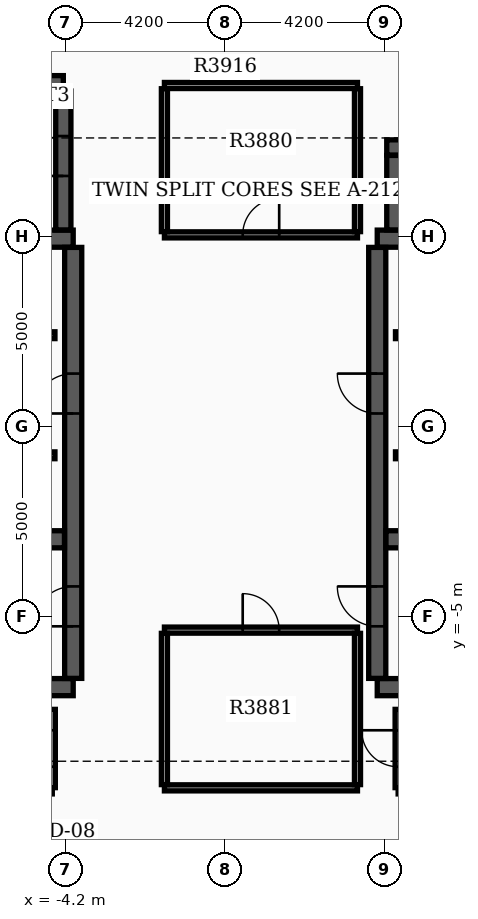
"""IFC4 building model, lengths in metres.
Left out: names, types, materials, properties, quantities, classifications, styles, units other than length and angle.
Written with IfcOpenShell. Run it as: python <this file> out.ifc"""

import sys

from ifc_helpers import new_model, si_unit, direction, frame, frame_2d, origin, place, context, subcontext, project, spatial, rectangle, extrude, element, fill, save


model = new_model("IFC4")
c1 = context("Model", 3, precision=1e-05, world=origin(), true_north=direction((0.0, 1.0)))
c2 = subcontext(c1, "Body", "Model", "MODEL_VIEW")
j1 = project(units=[si_unit("LENGTHUNIT", "METRE"), si_unit("PLANEANGLEUNIT", "RADIAN")], contexts=[c1])
p1 = place(None, origin())
s1 = spatial("IfcSite", under=j1, at=p1, CompositionType="ELEMENT")
p2 = place(p1, origin())
s2 = spatial("IfcBuilding", under=s1, at=p2, CompositionType="ELEMENT")
p3 = place(p2, frame((0.0, 0.0, 245.4)))
s3 = spatial("IfcBuildingStorey", under=s2, at=p3, CompositionType="ELEMENT", Elevation=245.4)
for number, where, z_axis, x_axis in (
    (1, (-12.4, -6.85, 0.0), (0.0, 0.0, 1.0), (1.0, 0.0, 0.0)),
    (2, (-12.4, 4.95, 0.0), (0.0, 0.0, 1.0), (1.0, 0.0, 0.0)),
):
    element("IfcWall", number, at=place(p3, frame(where, z_axis=z_axis, x_axis=x_axis)), inside=s3, PredefinedType="SHEAR", context=c2, shape_type="SweptSolid", body=[
        extrude(rectangle(XDim=8.4, YDim=0.45, at=frame_2d((4.2, 0.0))), origin(), (0.0, 0.0, 1.0), 4.3),
    ])
p4 = place(p3, frame((-4.0, -6.62, 0.0), z_axis=(0.0, 0.0, 1.0), x_axis=(0.0, 1.0, 0.0)))
e3 = element("IfcWall", 3, at=p4, inside=s3, PredefinedType="SHEAR", context=c2, shape_type="SweptSolid", body=[
    extrude(rectangle(XDim=11.34, YDim=0.45, at=frame_2d((5.67, 0.0))), origin(), (0.0, 0.0, 1.0), 4.3),
])
p5 = place(p4, frame((1.37, 0.0, 0.0)))
e4 = element("IfcOpeningElement", 4, at=p5, cuts=e3, PredefinedType="OPENING", context=c2, shape_type="SweptSolid", body=[
    extrude(rectangle(XDim=1.05, YDim=2.15, at=frame_2d((0.525, 1.075))), frame((0.0, 0.235, 0.0), z_axis=(0.0, -1.0, 0.0), x_axis=(1.0, 0.0, 0.0)), (0.0, 0.0, 1.0), 0.47),
])
p6 = place(p4, frame((6.97, 0.0, 0.0)))
e5 = element("IfcOpeningElement", 5, at=p6, cuts=e3, PredefinedType="OPENING", context=c2, shape_type="SweptSolid", body=[
    extrude(rectangle(XDim=1.05, YDim=2.15, at=frame_2d((0.525, 1.075))), frame((0.0, 0.235, 0.0), z_axis=(0.0, -1.0, 0.0), x_axis=(1.0, 0.0, 0.0)), (0.0, 0.0, 1.0), 0.47),
])
p7 = place(p3, frame((-12.17, -2.96, 0.0), z_axis=(0.0, 0.0, 1.0), x_axis=(1.0, 0.0, 0.0)))
e6 = element("IfcWall", 6, at=p7, inside=s3, PredefinedType="SHEAR", context=c2, shape_type="SweptSolid", body=[
    extrude(rectangle(XDim=7.94, YDim=0.45, at=frame_2d((3.97, 0.0))), origin(), (0.0, 0.0, 1.0), 4.3),
])
for number, where, z_axis, x_axis in (
    (7, (4.0, -6.85, 0.0), (0.0, 0.0, 1.0), (1.0, 0.0, 0.0)),
    (8, (4.0, 4.95, 0.0), (0.0, 0.0, 1.0), (1.0, 0.0, 0.0)),
):
    element("IfcWall", number, at=place(p3, frame(where, z_axis=z_axis, x_axis=x_axis)), inside=s3, PredefinedType="SHEAR", context=c2, shape_type="SweptSolid", body=[
        extrude(rectangle(XDim=8.4, YDim=0.45, at=frame_2d((4.2, 0.0))), origin(), (0.0, 0.0, 1.0), 4.3),
    ])
p8 = place(p3, frame((4.0, -6.62, 0.0), z_axis=(0.0, 0.0, 1.0), x_axis=(0.0, 1.0, 0.0)))
e9 = element("IfcWall", 9, at=p8, inside=s3, PredefinedType="SHEAR", context=c2, shape_type="SweptSolid", body=[
    extrude(rectangle(XDim=11.34, YDim=0.45, at=frame_2d((5.67, 0.0))), origin(), (0.0, 0.0, 1.0), 4.3),
])
p9 = place(p8, frame((1.37, 0.0, 0.0)))
e10 = element("IfcOpeningElement", 10, at=p9, cuts=e9, PredefinedType="OPENING", context=c2, shape_type="SweptSolid", body=[
    extrude(rectangle(XDim=1.05, YDim=2.15, at=frame_2d((0.525, 1.075))), frame((0.0, 0.235, 0.0), z_axis=(0.0, -1.0, 0.0), x_axis=(1.0, 0.0, 0.0)), (0.0, 0.0, 1.0), 0.47),
])
p10 = place(p8, frame((6.97, 0.0, 0.0)))
e11 = element("IfcOpeningElement", 11, at=p10, cuts=e9, PredefinedType="OPENING", context=c2, shape_type="SweptSolid", body=[
    extrude(rectangle(XDim=1.05, YDim=2.15, at=frame_2d((0.525, 1.075))), frame((0.0, 0.235, 0.0), z_axis=(0.0, -1.0, 0.0), x_axis=(1.0, 0.0, 0.0)), (0.0, 0.0, 1.0), 0.47),
])
p11 = place(p3, frame((4.23, -2.96, 0.0), z_axis=(0.0, 0.0, 1.0), x_axis=(1.0, 0.0, 0.0)))
e12 = element("IfcWall", 12, at=p11, inside=s3, PredefinedType="SHEAR", context=c2, shape_type="SweptSolid", body=[
    extrude(rectangle(XDim=7.94, YDim=0.45, at=frame_2d((3.97, 0.0))), origin(), (0.0, 0.0, 1.0), 4.3),
])
p12 = place(p3, frame((-12.22, 9.04, 0.0), z_axis=(0.0, 0.0, 1.0), x_axis=(1.0, 0.0, 0.0)))
e13 = element("IfcWall", 13, at=p12, inside=s3, PredefinedType="SHEAR", context=c2, shape_type="SweptSolid", body=[
    extrude(rectangle(XDim=7.96, YDim=0.4, at=frame_2d((3.98, 0.0))), origin(), (0.0, 0.0, 1.0), 4.3),
])
p13 = place(p3, frame((-4.26, 5.18, 0.0), z_axis=(0.0, 0.0, 1.0), x_axis=(0.0, 1.0, 0.0)))
e14 = element("IfcWall", 14, at=p13, inside=s3, PredefinedType="SHEAR", context=c2, shape_type="SweptSolid", body=[
    extrude(rectangle(XDim=3.655, YDim=0.4, at=frame_2d((1.828, 0.0))), origin(), (0.0, 0.0, 1.0), 4.3),
])
p14 = place(p13, frame((1.42, 0.0, 0.0)))
e15 = element("IfcOpeningElement", 15, at=p14, cuts=e14, PredefinedType="OPENING", context=c2, shape_type="SweptSolid", body=[
    extrude(rectangle(XDim=1.05, YDim=2.15, at=frame_2d((0.525, 1.075))), frame((0.0, 0.21, 0.0), z_axis=(0.0, -1.0, 0.0), x_axis=(1.0, 0.0, 0.0)), (0.0, 0.0, 1.0), 0.42),
])
p15 = place(p3, frame((4.45, 5.18, 0.0), z_axis=(0.0, 0.0, 1.0), x_axis=(0.0, 1.0, 0.0)))
e16 = element("IfcWall", 16, at=p15, inside=s3, PredefinedType="SHEAR", context=c2, shape_type="SweptSolid", body=[
    extrude(rectangle(XDim=1.96, YDim=0.4, at=frame_2d((0.98, 0.0))), origin(), (0.0, 0.0, 1.0), 4.3),
])
p16 = place(p3, frame((4.25, 7.35, 0.0), z_axis=(0.0, 0.0, 1.0), x_axis=(1.0, 0.0, 0.0)))
e17 = element("IfcWall", 17, at=p16, inside=s3, PredefinedType="SHEAR", context=c2, shape_type="SweptSolid", body=[
    extrude(rectangle(XDim=5.4, YDim=0.4, at=frame_2d((2.7, 0.0))), origin(), (0.0, 0.0, 1.0), 4.3),
])
p17 = place(p3, frame((-11.9, 2.41, 0.0), z_axis=(0.0, 0.0, 1.0), x_axis=(1.0, 0.0, 0.0)))
e18 = element("IfcWall", 18, at=p17, inside=s3, PredefinedType="SOLIDWALL", context=c2, shape_type="SweptSolid", body=[
    extrude(rectangle(XDim=7.42, YDim=0.18, at=frame_2d((3.71, 0.0))), origin(), (0.0, 0.0, 1.0), 3.37),
])
p18 = place(p17, frame((0.55, 0.0, 0.0)))
e19 = element("IfcOpeningElement", 19, at=p18, cuts=e18, PredefinedType="OPENING", context=c2, shape_type="SweptSolid", body=[
    extrude(rectangle(XDim=1.1, YDim=2.15, at=frame_2d((0.55, 1.075))), frame((0.0, 0.1, 0.0), z_axis=(0.0, -1.0, 0.0), x_axis=(1.0, 0.0, 0.0)), (0.0, 0.0, 1.0), 0.2),
])
p19 = place(p17, frame((4.9, 0.0, 0.0)))
e20 = element("IfcOpeningElement", 20, at=p19, cuts=e18, PredefinedType="OPENING", context=c2, shape_type="SweptSolid", body=[
    extrude(rectangle(XDim=0.88, YDim=2.1, at=frame_2d((0.44, 1.05))), frame((0.0, 0.1, 0.0), z_axis=(0.0, -1.0, 0.0), x_axis=(1.0, 0.0, 0.0)), (0.0, 0.0, 1.0), 0.2),
])
p20 = place(p3, frame((4.48, 2.41, 0.0), z_axis=(0.0, 0.0, 1.0), x_axis=(1.0, 0.0, 0.0)))
e21 = element("IfcWall", 21, at=p20, inside=s3, PredefinedType="SOLIDWALL", context=c2, shape_type="SweptSolid", body=[
    extrude(rectangle(XDim=7.42, YDim=0.18, at=frame_2d((3.71, 0.0))), origin(), (0.0, 0.0, 1.0), 3.37),
])
p21 = place(p20, frame((5.67, 0.0, 0.0)))
e22 = element("IfcOpeningElement", 22, at=p21, cuts=e21, PredefinedType="OPENING", context=c2, shape_type="SweptSolid", body=[
    extrude(rectangle(XDim=1.1, YDim=2.15, at=frame_2d((0.55, 1.075))), frame((0.0, 0.1, 0.0), z_axis=(0.0, -1.0, 0.0), x_axis=(1.0, 0.0, 0.0)), (0.0, 0.0, 1.0), 0.2),
])
p22 = place(p20, frame((1.6, 0.0, 0.0)))
e23 = element("IfcOpeningElement", 23, at=p22, cuts=e21, PredefinedType="OPENING", context=c2, shape_type="SweptSolid", body=[
    extrude(rectangle(XDim=0.88, YDim=2.1, at=frame_2d((0.44, 1.05))), frame((0.0, 0.1, 0.0), z_axis=(0.0, -1.0, 0.0), x_axis=(1.0, 0.0, 0.0)), (0.0, 0.0, 1.0), 0.2),
])
p23 = place(p3, frame((-11.9, -0.75, 0.0), z_axis=(0.0, 0.0, 1.0), x_axis=(1.0, 0.0, 0.0)))
e24 = element("IfcWall", 24, at=p23, inside=s3, PredefinedType="SOLIDWALL", context=c2, shape_type="SweptSolid", body=[
    extrude(rectangle(XDim=7.42, YDim=0.18, at=frame_2d((3.71, 0.0))), origin(), (0.0, 0.0, 1.0), 3.37),
])
p24 = place(p23, frame((5.75, 0.0, 0.0)))
e25 = element("IfcOpeningElement", 25, at=p24, cuts=e24, PredefinedType="OPENING", context=c2, shape_type="SweptSolid", body=[
    extrude(rectangle(XDim=1.1, YDim=2.15, at=frame_2d((0.55, 1.075))), frame((0.0, 0.1, 0.0), z_axis=(0.0, -1.0, 0.0), x_axis=(1.0, 0.0, 0.0)), (0.0, 0.0, 1.0), 0.2),
])
p25 = place(p23, frame((1.6, 0.0, 0.0)))
e26 = element("IfcOpeningElement", 26, at=p25, cuts=e24, PredefinedType="OPENING", context=c2, shape_type="SweptSolid", body=[
    extrude(rectangle(XDim=0.88, YDim=2.1, at=frame_2d((0.44, 1.05))), frame((0.0, 0.1, 0.0), z_axis=(0.0, -1.0, 0.0), x_axis=(1.0, 0.0, 0.0)), (0.0, 0.0, 1.0), 0.2),
])
p26 = place(p3, frame((4.48, -0.75, 0.0), z_axis=(0.0, 0.0, 1.0), x_axis=(1.0, 0.0, 0.0)))
e27 = element("IfcWall", 27, at=p26, inside=s3, PredefinedType="SOLIDWALL", context=c2, shape_type="SweptSolid", body=[
    extrude(rectangle(XDim=7.42, YDim=0.18, at=frame_2d((3.71, 0.0))), origin(), (0.0, 0.0, 1.0), 3.37),
])
p27 = place(p26, frame((3.92, 0.0, 0.0)))
e28 = element("IfcOpeningElement", 28, at=p27, cuts=e27, PredefinedType="OPENING", context=c2, shape_type="SweptSolid", body=[
    extrude(rectangle(XDim=1.1, YDim=2.15, at=frame_2d((0.55, 1.075))), frame((0.0, 0.1, 0.0), z_axis=(0.0, -1.0, 0.0), x_axis=(1.0, 0.0, 0.0)), (0.0, 0.0, 1.0), 0.2),
])
p28 = place(p26, frame((5.82, 0.0, 0.0)))
e29 = element("IfcOpeningElement", 29, at=p28, cuts=e27, PredefinedType="OPENING", context=c2, shape_type="SweptSolid", body=[
    extrude(rectangle(XDim=1.1, YDim=2.15, at=frame_2d((0.55, 1.075))), frame((0.0, 0.1, 0.0), z_axis=(0.0, -1.0, 0.0), x_axis=(1.0, 0.0, 0.0)), (0.0, 0.0, 1.0), 0.2),
])
p29 = place(p26, frame((1.6, 0.0, 0.0)))
e30 = element("IfcOpeningElement", 30, at=p29, cuts=e27, PredefinedType="OPENING", context=c2, shape_type="SweptSolid", body=[
    extrude(rectangle(XDim=0.88, YDim=2.1, at=frame_2d((0.44, 1.05))), frame((0.0, 0.1, 0.0), z_axis=(0.0, -1.0, 0.0), x_axis=(1.0, 0.0, 0.0)), (0.0, 0.0, 1.0), 0.2),
])
p30 = place(p3, frame((-1.6, 5.05, 0.0), z_axis=(0.0, 0.0, 1.0), x_axis=(1.0, 0.0, 0.0)))
e31 = element("IfcWall", 31, at=p30, inside=s3, PredefinedType="PARTITIONING", context=c2, shape_type="SweptSolid", body=[
    extrude(rectangle(XDim=5.08, YDim=0.16, at=frame_2d((2.54, 0.0))), origin(), (0.0, 0.0, 1.0), 3.37),
])
p31 = place(p30, frame((2.06, 0.0, 0.0)))
e32 = element("IfcOpeningElement", 32, at=p31, cuts=e31, PredefinedType="OPENING", context=c2, shape_type="SweptSolid", body=[
    extrude(rectangle(XDim=0.96, YDim=2.15, at=frame_2d((0.48, 1.075))), frame((0.0, 0.09, 0.0), z_axis=(0.0, -1.0, 0.0), x_axis=(1.0, 0.0, 0.0)), (0.0, 0.0, 1.0), 0.18),
])
p32 = place(p3, frame((-1.6, 8.98, 0.0), z_axis=(0.0, 0.0, 1.0), x_axis=(1.0, 0.0, 0.0)))
e33 = element("IfcWall", 33, at=p32, inside=s3, PredefinedType="PARTITIONING", context=c2, shape_type="SweptSolid", body=[
    extrude(rectangle(XDim=5.08, YDim=0.16, at=frame_2d((2.54, 0.0))), origin(), (0.0, 0.0, 1.0), 3.37),
])
for number, where, z_axis, x_axis in (
    (34, (-1.6, 5.135, 0.0), (0.0, 0.0, 1.0), (0.0, 1.0, 0.0)),
    (35, (3.48, 5.135, 0.0), (0.0, 0.0, 1.0), (0.0, 1.0, 0.0)),
):
    element("IfcWall", number, at=place(p3, frame(where, z_axis=z_axis, x_axis=x_axis)), inside=s3, PredefinedType="PARTITIONING", context=c2, shape_type="SweptSolid", body=[
        extrude(rectangle(XDim=3.76, YDim=0.16, at=frame_2d((1.88, 0.0))), origin(), (0.0, 0.0, 1.0), 3.37),
    ])
p33 = place(p3, frame((-1.6, -9.5, 0.0), z_axis=(0.0, 0.0, 1.0), x_axis=(1.0, 0.0, 0.0)))
e36 = element("IfcWall", 36, at=p33, inside=s3, PredefinedType="PARTITIONING", context=c2, shape_type="SweptSolid", body=[
    extrude(rectangle(XDim=5.08, YDim=0.16, at=frame_2d((2.54, 0.0))), origin(), (0.0, 0.0, 1.0), 3.37),
])
p34 = place(p3, frame((-1.6, -5.35, 0.0), z_axis=(0.0, 0.0, 1.0), x_axis=(1.0, 0.0, 0.0)))
e37 = element("IfcWall", 37, at=p34, inside=s3, PredefinedType="PARTITIONING", context=c2, shape_type="SweptSolid", body=[
    extrude(rectangle(XDim=5.08, YDim=0.16, at=frame_2d((2.54, 0.0))), origin(), (0.0, 0.0, 1.0), 3.37),
])
p35 = place(p34, frame((2.06, 0.0, 0.0)))
e38 = element("IfcOpeningElement", 38, at=p35, cuts=e37, PredefinedType="OPENING", context=c2, shape_type="SweptSolid", body=[
    extrude(rectangle(XDim=0.96, YDim=2.15, at=frame_2d((0.48, 1.075))), frame((0.0, 0.09, 0.0), z_axis=(0.0, -1.0, 0.0), x_axis=(1.0, 0.0, 0.0)), (0.0, 0.0, 1.0), 0.18),
])
for number, where, z_axis, x_axis in (
    (39, (-1.6, -9.415, 0.0), (0.0, 0.0, 1.0), (0.0, 1.0, 0.0)),
    (40, (3.48, -9.415, 0.0), (0.0, 0.0, 1.0), (0.0, 1.0, 0.0)),
):
    element("IfcWall", number, at=place(p3, frame(where, z_axis=z_axis, x_axis=x_axis)), inside=s3, PredefinedType="PARTITIONING", context=c2, shape_type="SweptSolid", body=[
        extrude(rectangle(XDim=3.98, YDim=0.16, at=frame_2d((1.99, 0.0))), origin(), (0.0, 0.0, 1.0), 3.37),
    ])
p36 = place(p3, frame((4.55, -9.58, 0.0), z_axis=(0.0, 0.0, 1.0), x_axis=(1.0, 0.0, 0.0)))
e41 = element("IfcWall", 41, at=p36, inside=s3, PredefinedType="PARTITIONING", context=c2, shape_type="SweptSolid", body=[
    extrude(rectangle(XDim=8.1, YDim=0.16, at=frame_2d((4.05, 0.0))), origin(), (0.0, 0.0, 1.0), 3.37),
])
p37 = place(p3, frame((4.55, -9.495, 0.0), z_axis=(0.0, 0.0, 1.0), x_axis=(0.0, 1.0, 0.0)))
e42 = element("IfcWall", 42, at=p37, inside=s3, PredefinedType="PARTITIONING", context=c2, shape_type="SweptSolid", body=[
    extrude(rectangle(XDim=2.06, YDim=0.16, at=frame_2d((1.03, 0.0))), origin(), (0.0, 0.0, 1.0), 3.37),
])
p38 = place(p37, frame((0.55, 0.0, 0.0)))
e43 = element("IfcOpeningElement", 43, at=p38, cuts=e42, PredefinedType="OPENING", context=c2, shape_type="SweptSolid", body=[
    extrude(rectangle(XDim=0.96, YDim=2.15, at=frame_2d((0.48, 1.075))), frame((0.0, 0.09, 0.0), z_axis=(0.0, -1.0, 0.0), x_axis=(1.0, 0.0, 0.0)), (0.0, 0.0, 1.0), 0.18),
])
p39 = place(p3, frame((-4.55, -9.495, 0.0), z_axis=(0.0, 0.0, 1.0), x_axis=(0.0, 1.0, 0.0)))
e44 = element("IfcWall", 44, at=p39, inside=s3, PredefinedType="PARTITIONING", context=c2, shape_type="SweptSolid", body=[
    extrude(rectangle(XDim=2.06, YDim=0.16, at=frame_2d((1.03, 0.0))), origin(), (0.0, 0.0, 1.0), 3.37),
])
p40 = place(p39, frame((0.55, 0.0, 0.0)))
e45 = element("IfcOpeningElement", 45, at=p40, cuts=e44, PredefinedType="OPENING", context=c2, shape_type="SweptSolid", body=[
    extrude(rectangle(XDim=0.96, YDim=2.15, at=frame_2d((0.48, 1.075))), frame((0.0, 0.09, 0.0), z_axis=(0.0, -1.0, 0.0), x_axis=(1.0, 0.0, 0.0)), (0.0, 0.0, 1.0), 0.18),
])
p41 = place(p5, origin())
e46 = element("IfcDoor", 46, at=p41, inside=s3, OperationType="SINGLE_SWING_LEFT", PredefinedType="DOOR", context=c2, shape_type="SweptSolid", body=[
    extrude(rectangle(XDim=1.05, YDim=2.15, at=frame_2d((0.525, 1.075))), frame((0.0, 0.025, 0.0), z_axis=(0.0, -1.0, 0.0), x_axis=(1.0, 0.0, 0.0)), (0.0, 0.0, 1.0), 0.05),
])
fill(e4, e46)
p42 = place(p9, origin())
e47 = element("IfcDoor", 47, at=p42, inside=s3, OperationType="SINGLE_SWING_RIGHT", PredefinedType="DOOR", context=c2, shape_type="SweptSolid", body=[
    extrude(rectangle(XDim=1.05, YDim=2.15, at=frame_2d((0.525, 1.075))), frame((0.0, 0.025, 0.0), z_axis=(0.0, -1.0, 0.0), x_axis=(1.0, 0.0, 0.0)), (0.0, 0.0, 1.0), 0.05),
])
fill(e10, e47)
p43 = place(p6, origin())
e48 = element("IfcDoor", 48, at=p43, inside=s3, OperationType="SINGLE_SWING_LEFT", PredefinedType="DOOR", context=c2, shape_type="SweptSolid", body=[
    extrude(rectangle(XDim=1.05, YDim=2.15, at=frame_2d((0.525, 1.075))), frame((0.0, 0.025, 0.0), z_axis=(0.0, -1.0, 0.0), x_axis=(1.0, 0.0, 0.0)), (0.0, 0.0, 1.0), 0.05),
])
fill(e5, e48)
p44 = place(p10, origin())
e49 = element("IfcDoor", 49, at=p44, inside=s3, OperationType="SINGLE_SWING_RIGHT", PredefinedType="DOOR", context=c2, shape_type="SweptSolid", body=[
    extrude(rectangle(XDim=1.05, YDim=2.15, at=frame_2d((0.525, 1.075))), frame((0.0, 0.025, 0.0), z_axis=(0.0, -1.0, 0.0), x_axis=(1.0, 0.0, 0.0)), (0.0, 0.0, 1.0), 0.05),
])
fill(e11, e49)
p45 = place(p14, origin())
e50 = element("IfcDoor", 50, at=p45, inside=s3, OperationType="SINGLE_SWING_LEFT", PredefinedType="DOOR", context=c2, shape_type="SweptSolid", body=[
    extrude(rectangle(XDim=1.05, YDim=2.15, at=frame_2d((0.525, 1.075))), frame((0.0, 0.025, 0.0), z_axis=(0.0, -1.0, 0.0), x_axis=(1.0, 0.0, 0.0)), (0.0, 0.0, 1.0), 0.05),
])
fill(e15, e50)
p46 = place(p31, origin())
e51 = element("IfcDoor", 51, at=p46, inside=s3, OperationType="SINGLE_SWING_RIGHT", PredefinedType="DOOR", context=c2, shape_type="SweptSolid", body=[
    extrude(rectangle(XDim=0.96, YDim=2.15, at=frame_2d((0.48, 1.075))), frame((0.0, 0.025, 0.0), z_axis=(0.0, -1.0, 0.0), x_axis=(1.0, 0.0, 0.0)), (0.0, 0.0, 1.0), 0.05),
])
fill(e32, e51)
p47 = place(p35, origin())
e52 = element("IfcDoor", 52, at=p47, inside=s3, OperationType="SINGLE_SWING_LEFT", PredefinedType="DOOR", context=c2, shape_type="SweptSolid", body=[
    extrude(rectangle(XDim=0.96, YDim=2.15, at=frame_2d((0.48, 1.075))), frame((0.0, 0.025, 0.0), z_axis=(0.0, -1.0, 0.0), x_axis=(1.0, 0.0, 0.0)), (0.0, 0.0, 1.0), 0.05),
])
fill(e38, e52)
p48 = place(p38, origin())
e53 = element("IfcDoor", 53, at=p48, inside=s3, OperationType="SINGLE_SWING_RIGHT", PredefinedType="DOOR", context=c2, shape_type="SweptSolid", body=[
    extrude(rectangle(XDim=0.96, YDim=2.15, at=frame_2d((0.48, 1.075))), frame((0.0, 0.025, 0.0), z_axis=(0.0, -1.0, 0.0), x_axis=(1.0, 0.0, 0.0)), (0.0, 0.0, 1.0), 0.05),
])
fill(e43, e53)
p49 = place(p40, origin())
e54 = element("IfcDoor", 54, at=p49, inside=s3, OperationType="SINGLE_SWING_LEFT", PredefinedType="DOOR", context=c2, shape_type="SweptSolid", body=[
    extrude(rectangle(XDim=0.96, YDim=2.15, at=frame_2d((0.48, 1.075))), frame((0.0, 0.025, 0.0), z_axis=(0.0, -1.0, 0.0), x_axis=(1.0, 0.0, 0.0)), (0.0, 0.0, 1.0), 0.05),
])
fill(e45, e54)
save(model, sys.argv[1])
